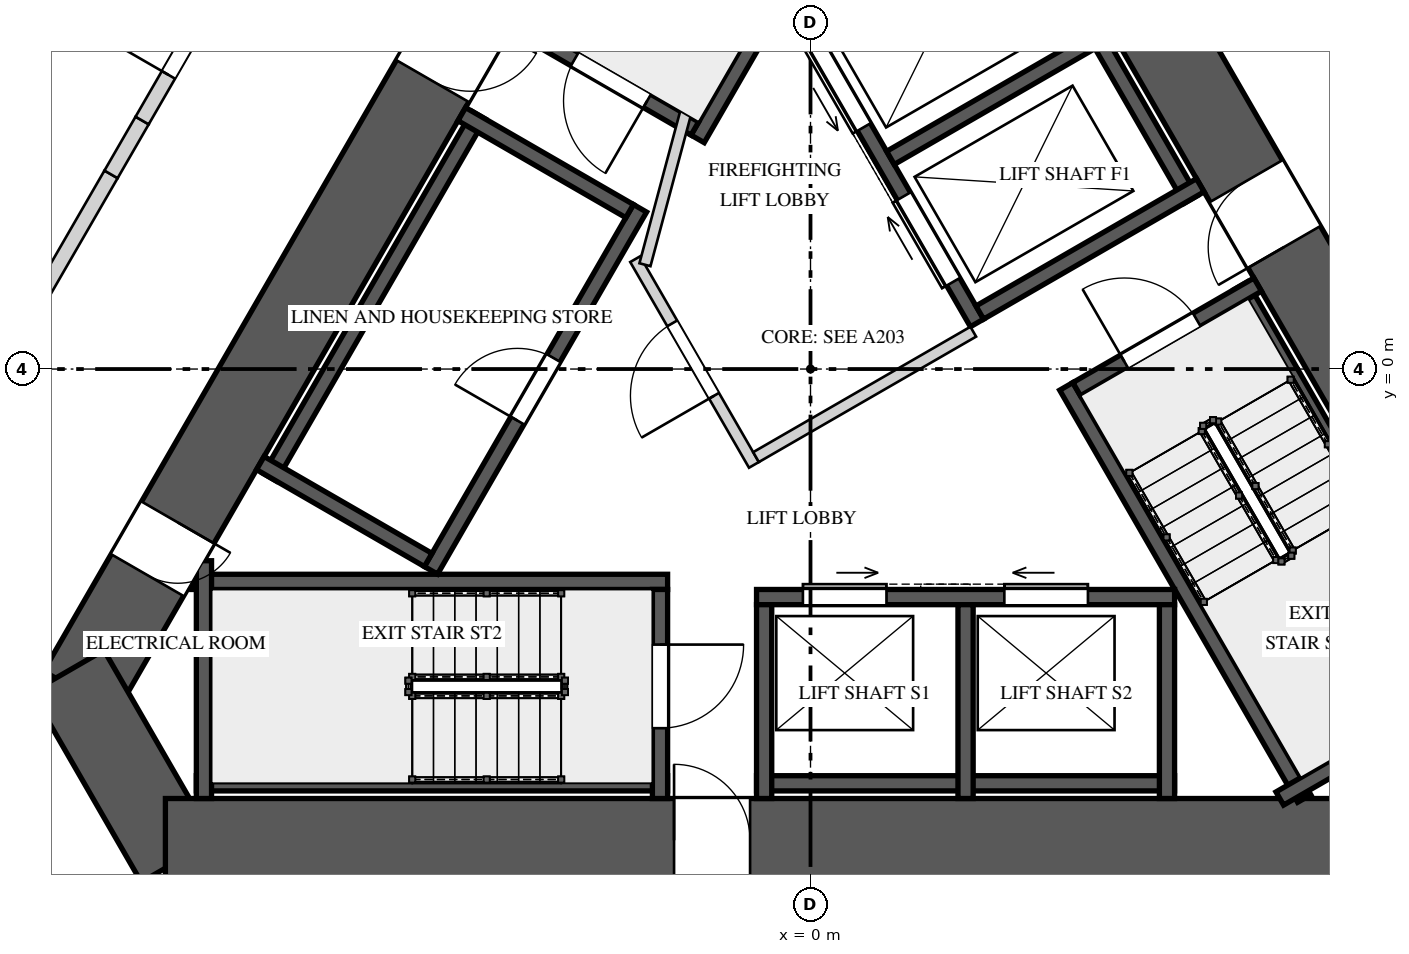
"""IFC4 building model, lengths in metres.
Left out: names, types, materials, properties, quantities, classifications, styles, units other than length and angle.
Written with IfcOpenShell. Run it as: python <this file> out.ifc"""

import sys

from ifc_helpers import new_model, si_unit, direction, frame, frame_2d, origin, place, context, subcontext, project, spatial, rectangle, extrude, element, fill, save


model = new_model("IFC4")
c1 = context("Model", 3, precision=1e-05, world=origin(), true_north=direction((0.0, 1.0)))
c2 = subcontext(c1, "Body", "Model", "MODEL_VIEW")
j1 = project(units=[si_unit("LENGTHUNIT", "METRE"), si_unit("PLANEANGLEUNIT", "RADIAN")], contexts=[c1])
p1 = place(None, origin())
s1 = spatial("IfcSite", under=j1, at=p1, CompositionType="ELEMENT")
p2 = place(p1, origin())
s2 = spatial("IfcBuilding", under=s1, at=p2, CompositionType="ELEMENT")
p3 = place(p2, frame((0.0, 0.0, 10.0)))
s3 = spatial("IfcBuildingStorey", under=s2, at=p3, CompositionType="ELEMENT", Elevation=10.0)
p4 = place(p3, frame((-1.126, 10.45, 0.0), z_axis=(0.0, 0.0, 1.0), x_axis=(-0.500001757713, -0.866024388966, 0.0)))
e1 = element("IfcWall", 1, at=p4, inside=s3, PredefinedType="SHEAR", context=c2, shape_type="SweptSolid", body=[
    extrude(rectangle(XDim=16.974, YDim=1.1, at=frame_2d((8.487, 0.0))), origin(), (0.0, 0.0, 1.0), 5.0),
])
p5 = place(p4, frame((6.692, 0.0, 0.0)))
e2 = element("IfcOpeningElement", 2, at=p5, cuts=e1, PredefinedType="OPENING", context=c2, shape_type="SweptSolid", body=[
    extrude(rectangle(XDim=1.0, YDim=2.4, at=frame_2d((0.5, 1.2))), frame((0.0, 0.56, 0.0), z_axis=(0.0, -1.0, 0.0), x_axis=(1.0, 0.0, 0.0)), (0.0, 0.0, 1.0), 1.12),
])
p6 = place(p4, frame((14.397, 0.0, 0.0)))
e3 = element("IfcOpeningElement", 3, at=p6, cuts=e1, PredefinedType="OPENING", context=c2, shape_type="SweptSolid", body=[
    extrude(rectangle(XDim=0.8, YDim=2.1, at=frame_2d((0.4, 1.05))), frame((0.0, 0.56, 0.0), z_axis=(0.0, -1.0, 0.0), x_axis=(1.0, 0.0, 0.0)), (0.0, 0.0, 1.0), 1.12),
])
p7 = place(p3, frame((-9.772, -3.975, 0.0), z_axis=(0.0, 0.0, 1.0), x_axis=(0.499995765644, -0.866027848477, 0.0)))
e4 = element("IfcWall", 4, at=p7, inside=s3, PredefinedType="SHEAR", context=c2, shape_type="SweptSolid", body=[
    extrude(rectangle(XDim=2.887, YDim=1.1, at=frame_2d((1.443, 0.0))), origin(), (0.0, 0.0, 1.0), 5.0),
])
p8 = place(p3, frame((-8.487, -6.2, 0.0), z_axis=(0.0, 0.0, 1.0), x_axis=(1.0, 0.0, 0.0)))
e5 = element("IfcWall", 5, at=p8, inside=s3, PredefinedType="SHEAR", context=c2, shape_type="SweptSolid", body=[
    extrude(rectangle(XDim=16.974, YDim=1.1, at=frame_2d((8.487, 0.0))), origin(), (0.0, 0.0, 1.0), 5.0),
])
p9 = place(p8, frame((6.692, 0.0, 0.0)))
e6 = element("IfcOpeningElement", 6, at=p9, cuts=e5, PredefinedType="OPENING", context=c2, shape_type="SweptSolid", body=[
    extrude(rectangle(XDim=1.0, YDim=2.4, at=frame_2d((0.5, 1.2))), frame((0.0, 0.56, 0.0), z_axis=(0.0, -1.0, 0.0), x_axis=(1.0, 0.0, 0.0)), (0.0, 0.0, 1.0), 1.12),
])
p10 = place(p3, frame((9.613, -4.25, 0.0), z_axis=(0.0, 0.0, 1.0), x_axis=(-0.500001757713, 0.866024388966, 0.0)))
e7 = element("IfcWall", 7, at=p10, inside=s3, PredefinedType="SHEAR", context=c2, shape_type="SweptSolid", body=[
    extrude(rectangle(XDim=16.974, YDim=1.1, at=frame_2d((8.487, 0.0))), origin(), (0.0, 0.0, 1.0), 5.0),
])
p11 = place(p10, frame((6.762, 0.0, 0.0)))
e8 = element("IfcOpeningElement", 8, at=p11, cuts=e7, PredefinedType="OPENING", context=c2, shape_type="SweptSolid", body=[
    extrude(rectangle(XDim=1.0, YDim=2.4, at=frame_2d((0.5, 1.2))), frame((0.0, 0.56, 0.0), z_axis=(0.0, -1.0, 0.0), x_axis=(1.0, 0.0, 0.0)), (0.0, 0.0, 1.0), 1.12),
])
p12 = place(p3, frame((1.646, 8.45, 0.0), z_axis=(0.0, 0.0, 1.0), x_axis=(-0.500006002103, -0.866021938441, 0.0)))
e9 = element("IfcWall", 9, at=p12, inside=s3, PredefinedType="SOLIDWALL", context=c2, shape_type="SweptSolid", body=[
    extrude(rectangle(XDim=6.261, YDim=0.2, at=frame_2d((3.13, 0.0))), origin(), (0.0, 0.0, 1.0), 4.65),
])
p13 = place(p3, frame((-1.521, 3.165, 0.0), z_axis=(0.0, 0.0, 1.0), x_axis=(-0.866027397988, 0.499996545922, 0.0)))
e10 = element("IfcWall", 10, at=p13, inside=s3, PredefinedType="SOLIDWALL", context=c2, shape_type="SweptSolid", body=[
    extrude(rectangle(XDim=2.75, YDim=0.2, at=frame_2d((1.375, 0.0))), origin(), (0.0, 0.0, 1.0), 4.65),
])
p14 = place(p13, frame((0.725, 0.0, 0.0)))
e11 = element("IfcOpeningElement", 11, at=p14, cuts=e10, PredefinedType="OPENING", context=c2, shape_type="SweptSolid", body=[
    extrude(rectangle(XDim=1.1, YDim=2.4, at=frame_2d((0.55, 1.2))), frame((0.0, 0.11, 0.0), z_axis=(0.0, -1.0, 0.0), x_axis=(1.0, 0.0, 0.0)), (0.0, 0.0, 1.0), 0.22),
])
p15 = place(p3, frame((-8.08, -5.45, 0.0), z_axis=(0.0, 0.0, 1.0), x_axis=(1.0, 0.0, 0.0)))
e12 = element("IfcWall", 12, at=p15, inside=s3, PredefinedType="SOLIDWALL", context=c2, shape_type="SweptSolid", body=[
    extrude(rectangle(XDim=6.2, YDim=0.2, at=frame_2d((3.1, 0.0))), origin(), (0.0, 0.0, 1.0), 4.65),
])
p16 = place(p3, frame((-8.141, -2.8, 0.0), z_axis=(0.0, 0.0, 1.0), x_axis=(1.0, 0.0, 0.0)))
e13 = element("IfcWall", 13, at=p16, inside=s3, PredefinedType="SOLIDWALL", context=c2, shape_type="SweptSolid", body=[
    extrude(rectangle(XDim=6.261, YDim=0.2, at=frame_2d((3.13, 0.0))), origin(), (0.0, 0.0, 1.0), 4.65),
])
p17 = place(p3, frame((-7.98, -2.522, 0.0), z_axis=(0.0, 0.0, 1.0), x_axis=(0.0, -1.0, 0.0)))
e14 = element("IfcWall", 14, at=p17, inside=s3, PredefinedType="SOLIDWALL", context=c2, shape_type="SweptSolid", body=[
    extrude(rectangle(XDim=3.128, YDim=0.2, at=frame_2d((1.564, 0.0))), origin(), (0.0, 0.0, 1.0), 4.65),
])
p18 = place(p3, frame((-1.98, -2.9, 0.0), z_axis=(0.0, 0.0, 1.0), x_axis=(0.0, -1.0, 0.0)))
e15 = element("IfcWall", 15, at=p18, inside=s3, PredefinedType="SOLIDWALL", context=c2, shape_type="SweptSolid", body=[
    extrude(rectangle(XDim=2.75, YDim=0.2, at=frame_2d((1.375, 0.0))), origin(), (0.0, 0.0, 1.0), 4.65),
])
p19 = place(p18, frame((0.725, 0.0, 0.0)))
e16 = element("IfcOpeningElement", 16, at=p19, cuts=e15, PredefinedType="OPENING", context=c2, shape_type="SweptSolid", body=[
    extrude(rectangle(XDim=1.1, YDim=2.4, at=frame_2d((0.55, 1.2))), frame((0.0, 0.11, 0.0), z_axis=(0.0, -1.0, 0.0), x_axis=(1.0, 0.0, 0.0)), (0.0, 0.0, 1.0), 0.22),
])
p20 = place(p3, frame((8.76, -4.272, 0.0), z_axis=(0.0, 0.0, 1.0), x_axis=(-0.49998037582, 0.866036733513, 0.0)))
e17 = element("IfcWall", 17, at=p20, inside=s3, PredefinedType="SOLIDWALL", context=c2, shape_type="SweptSolid", body=[
    extrude(rectangle(XDim=6.2, YDim=0.2, at=frame_2d((3.1, 0.0))), origin(), (0.0, 0.0, 1.0), 4.65),
])
p21 = place(p3, frame((6.495, -5.65, 0.0), z_axis=(0.0, 0.0, 1.0), x_axis=(-0.499976754523, 0.866038824151, 0.0)))
e18 = element("IfcWall", 18, at=p21, inside=s3, PredefinedType="SOLIDWALL", context=c2, shape_type="SweptSolid", body=[
    extrude(rectangle(XDim=6.26, YDim=0.2, at=frame_2d((3.13, 0.0))), origin(), (0.0, 0.0, 1.0), 4.65),
])
p22 = place(p3, frame((6.174, -5.65, 0.0), z_axis=(0.0, 0.0, 1.0), x_axis=(0.866054327916, 0.499949898588, 0.0)))
e19 = element("IfcWall", 19, at=p22, inside=s3, PredefinedType="SOLIDWALL", context=c2, shape_type="SweptSolid", body=[
    extrude(rectangle(XDim=3.128, YDim=0.2, at=frame_2d((1.564, 0.0))), origin(), (0.0, 0.0, 1.0), 4.65),
])
p23 = place(p3, frame((3.501, -0.265, 0.0), z_axis=(0.0, 0.0, 1.0), x_axis=(0.866027397988, 0.499996545922, 0.0)))
e20 = element("IfcWall", 20, at=p23, inside=s3, PredefinedType="SOLIDWALL", context=c2, shape_type="SweptSolid", body=[
    extrude(rectangle(XDim=2.75, YDim=0.2, at=frame_2d((1.375, 0.0))), origin(), (0.0, 0.0, 1.0), 4.65),
])
p24 = place(p23, frame((0.725, 0.0, 0.0)))
e21 = element("IfcOpeningElement", 21, at=p24, cuts=e20, PredefinedType="OPENING", context=c2, shape_type="SweptSolid", body=[
    extrude(rectangle(XDim=1.1, YDim=2.4, at=frame_2d((0.55, 1.2))), frame((0.0, 0.11, 0.0), z_axis=(0.0, -1.0, 0.0), x_axis=(1.0, 0.0, 0.0)), (0.0, 0.0, 1.0), 0.22),
])
p25 = place(p3, frame((-4.993, -2.648, 0.0), z_axis=(0.0, 0.0, 1.0), x_axis=(0.499996545922, 0.866027397988, 0.0)))
e22 = element("IfcWall", 22, at=p25, inside=s3, PredefinedType="SOLIDWALL", context=c2, shape_type="SweptSolid", body=[
    extrude(rectangle(XDim=5.5, YDim=0.2, at=frame_2d((2.75, 0.0))), origin(), (0.0, 0.0, 1.0), 4.65),
])
p26 = place(p25, frame((2.275, 0.0, 0.0)))
e23 = element("IfcOpeningElement", 23, at=p26, cuts=e22, PredefinedType="OPENING", context=c2, shape_type="SweptSolid", body=[
    extrude(rectangle(XDim=0.95, YDim=2.4, at=frame_2d((0.475, 1.2))), frame((0.0, 0.11, 0.0), z_axis=(0.0, -1.0, 0.0), x_axis=(1.0, 0.0, 0.0)), (0.0, 0.0, 1.0), 0.22),
])
p27 = place(p3, frame((-4.365, 3.34, 0.0), z_axis=(0.0, 0.0, 1.0), x_axis=(-0.499996545922, -0.866027397988, 0.0)))
e24 = element("IfcWall", 24, at=p27, inside=s3, PredefinedType="SOLIDWALL", context=c2, shape_type="SweptSolid", body=[
    extrude(rectangle(XDim=5.5, YDim=0.2, at=frame_2d((2.75, 0.0))), origin(), (0.0, 0.0, 1.0), 4.65),
])
for number, where, z_axis, x_axis in (
    (25, (-2.38, 2.078, 0.0), (0.0, 0.0, 1.0), (-0.866, 0.5, 0.0)),
    (26, (-5.03, -2.512, 0.0), (0.0, 0.0, 1.0), (-0.866, 0.5, 0.0)),
):
    element("IfcWall", number, at=place(p3, frame(where, z_axis=z_axis, x_axis=x_axis)), inside=s3, PredefinedType="SOLIDWALL", context=c2, shape_type="SweptSolid", body=[
        extrude(rectangle(XDim=2.55, YDim=0.2, at=frame_2d((1.275, 0.0))), origin(), (0.0, 0.0, 1.0), 4.65),
    ])
p28 = place(p3, frame((-0.71, -3.0, 0.0), z_axis=(0.0, 0.0, 1.0), x_axis=(1.0, 0.0, 0.0)))
e27 = element("IfcWall", 27, at=p28, inside=s3, PredefinedType="SOLIDWALL", context=c2, shape_type="SweptSolid", body=[
    extrude(rectangle(XDim=5.5, YDim=0.2, at=frame_2d((2.75, 0.0))), origin(), (0.0, 0.0, 1.0), 4.65),
])
p29 = place(p28, frame((0.61, 0.0, 0.0)))
e28 = element("IfcOpeningElement", 28, at=p29, cuts=e27, PredefinedType="OPENING", context=c2, shape_type="SweptSolid", body=[
    extrude(rectangle(XDim=1.1, YDim=2.1, at=frame_2d((0.55, 1.05))), frame((0.0, 0.11, 0.0), z_axis=(0.0, -1.0, 0.0), x_axis=(1.0, 0.0, 0.0)), (0.0, 0.0, 1.0), 0.22),
])
p30 = place(p28, frame((3.26, 0.0, 0.0)))
e29 = element("IfcOpeningElement", 29, at=p30, cuts=e27, PredefinedType="OPENING", context=c2, shape_type="SweptSolid", body=[
    extrude(rectangle(XDim=1.1, YDim=2.1, at=frame_2d((0.55, 1.05))), frame((0.0, 0.11, 0.0), z_axis=(0.0, -1.0, 0.0), x_axis=(1.0, 0.0, 0.0)), (0.0, 0.0, 1.0), 0.22),
])
p31 = place(p3, frame((-0.71, -5.45, 0.0), z_axis=(0.0, 0.0, 1.0), x_axis=(1.0, 0.0, 0.0)))
e30 = element("IfcWall", 30, at=p31, inside=s3, PredefinedType="SOLIDWALL", context=c2, shape_type="SweptSolid", body=[
    extrude(rectangle(XDim=5.5, YDim=0.2, at=frame_2d((2.75, 0.0))), origin(), (0.0, 0.0, 1.0), 4.65),
])
for number, where, z_axis, x_axis in (
    (31, (-0.61, -3.1, 0.0), (0.0, 0.0, 1.0), (0.0, -1.0, 0.0)),
    (32, (2.04, -3.1, 0.0), (0.0, 0.0, 1.0), (0.0, -1.0, 0.0)),
    (33, (4.69, -3.1, 0.0), (0.0, 0.0, 1.0), (0.0, -1.0, 0.0)),
):
    element("IfcWall", number, at=place(p3, frame(where, z_axis=z_axis, x_axis=x_axis)), inside=s3, PredefinedType="SOLIDWALL", context=c2, shape_type="SweptSolid", body=[
        extrude(rectangle(XDim=2.55, YDim=0.2, at=frame_2d((1.275, 0.0))), origin(), (0.0, 0.0, 1.0), 4.65),
    ])
p32 = place(p3, frame((2.19, 0.606, 0.0), z_axis=(0.0, 0.0, 1.0), x_axis=(-0.500002801628, 0.866023786258, 0.0)))
e34 = element("IfcWall", 34, at=p32, inside=s3, PredefinedType="SOLIDWALL", context=c2, shape_type="SweptSolid", body=[
    extrude(rectangle(XDim=4.9, YDim=0.2, at=frame_2d((2.45, 0.0))), origin(), (0.0, 0.0, 1.0), 4.65),
])
p33 = place(p32, frame((0.625, 0.0, 0.0)))
e35 = element("IfcOpeningElement", 35, at=p33, cuts=e34, PredefinedType="OPENING", context=c2, shape_type="SweptSolid", body=[
    extrude(rectangle(XDim=1.3, YDim=2.1, at=frame_2d((0.65, 1.05))), frame((0.0, 0.11, 0.0), z_axis=(0.0, -1.0, 0.0), x_axis=(1.0, 0.0, 0.0)), (0.0, 0.0, 1.0), 0.22),
])
p34 = place(p32, frame((2.975, 0.0, 0.0)))
e36 = element("IfcOpeningElement", 36, at=p34, cuts=e34, PredefinedType="OPENING", context=c2, shape_type="SweptSolid", body=[
    extrude(rectangle(XDim=1.3, YDim=2.1, at=frame_2d((0.65, 1.05))), frame((0.0, 0.11, 0.0), z_axis=(0.0, -1.0, 0.0), x_axis=(1.0, 0.0, 0.0)), (0.0, 0.0, 1.0), 0.22),
])
p35 = place(p3, frame((5.005, 2.231, 0.0), z_axis=(0.0, 0.0, 1.0), x_axis=(-0.500002801628, 0.866023786258, 0.0)))
e37 = element("IfcWall", 37, at=p35, inside=s3, PredefinedType="SOLIDWALL", context=c2, shape_type="SweptSolid", body=[
    extrude(rectangle(XDim=4.9, YDim=0.2, at=frame_2d((2.45, 0.0))), origin(), (0.0, 0.0, 1.0), 4.65),
])
p36 = place(p3, frame((2.227, 0.743, 0.0), z_axis=(0.0, 0.0, 1.0), x_axis=(0.866014461049, 0.500018952895, 0.0)))
e38 = element("IfcWall", 38, at=p36, inside=s3, PredefinedType="SOLIDWALL", context=c2, shape_type="SweptSolid", body=[
    extrude(rectangle(XDim=3.35, YDim=0.2, at=frame_2d((1.675, 0.0))), origin(), (0.0, 0.0, 1.0), 4.65),
])
p37 = place(p3, frame((1.052, 2.778, 0.0), z_axis=(0.0, 0.0, 1.0), x_axis=(0.866032680314, 0.499987396469, 0.0)))
e39 = element("IfcWall", 39, at=p37, inside=s3, PredefinedType="SOLIDWALL", context=c2, shape_type="SweptSolid", body=[
    extrude(rectangle(XDim=3.35, YDim=0.2, at=frame_2d((1.675, 0.0))), origin(), (0.0, 0.0, 1.0), 4.65),
])
p38 = place(p3, frame((-0.744, -1.261, 0.0), z_axis=(0.0, 0.0, 1.0), x_axis=(-0.500004234368, 0.866022959057, 0.0)))
e40 = element("IfcWall", 40, at=p38, inside=s3, PredefinedType="PARTITIONING", context=c2, shape_type="SweptSolid", body=[
    extrude(rectangle(XDim=3.125, YDim=0.15, at=frame_2d((1.562, 0.0))), origin(), (0.0, 0.0, 1.0), 4.65),
])
p39 = place(p38, frame((1.05, 0.0, 0.0)))
e41 = element("IfcOpeningElement", 41, at=p39, cuts=e40, PredefinedType="OPENING", context=c2, shape_type="SweptSolid", body=[
    extrude(rectangle(XDim=1.1, YDim=2.4, at=frame_2d((0.55, 1.2))), frame((0.0, 0.085, 0.0), z_axis=(0.0, -1.0, 0.0), x_axis=(1.0, 0.0, 0.0)), (0.0, 0.0, 1.0), 0.17),
])
p40 = place(p3, frame((-0.717, -1.159, 0.0), z_axis=(0.0, 0.0, 1.0), x_axis=(0.866008176907, 0.50002983664, 0.0)))
e42 = element("IfcWall", 42, at=p40, inside=s3, PredefinedType="PARTITIONING", context=c2, shape_type="SweptSolid", body=[
    extrude(rectangle(XDim=3.3, YDim=0.15, at=frame_2d((1.65, 0.0))), origin(), (0.0, 0.0, 1.0), 4.65),
])
p41 = place(p3, frame((-2.178, 1.372, 0.0), z_axis=(0.0, 0.0, 1.0), x_axis=(0.258808958833, 0.96592852884, 0.0)))
e43 = element("IfcWall", 43, at=p41, inside=s3, PredefinedType="PARTITIONING", context=c2, shape_type="SweptSolid", body=[
    extrude(rectangle(XDim=2.903, YDim=0.15, at=frame_2d((1.451, 0.0))), origin(), (0.0, 0.0, 1.0), 4.65),
])
p42 = place(p3, frame((-1.51, 4.215, 0.0), z_axis=(0.0, 0.0, 1.0), x_axis=(0.866085525409, 0.49989585183, 0.0)))
e44 = element("IfcWall", 44, at=p42, inside=s3, PredefinedType="PARTITIONING", context=c2, shape_type="SweptSolid", body=[
    extrude(rectangle(XDim=1.3, YDim=0.15, at=frame_2d((0.65, 0.0))), origin(), (0.0, 0.0, 1.0), 4.65),
])
p43 = place(p3, frame((-10.734, -0.093, 0.0), z_axis=(0.0, 0.0, 1.0), x_axis=(0.499952348839, 0.866052913447, 0.0)))
e45 = element("IfcWall", 45, at=p43, inside=s3, PredefinedType="SOLIDWALL", context=c2, shape_type="SweptSolid", body=[
    extrude(rectangle(XDim=3.064, YDim=0.2, at=frame_2d((1.532, 0.0))), origin(), (0.0, 0.0, 1.0), 4.65),
])
p44 = place(p3, frame((-9.202, 2.561, 0.0), z_axis=(0.0, 0.0, 1.0), x_axis=(0.500118501653, 0.865956976012, 0.0)))
e46 = element("IfcWall", 46, at=p44, inside=s3, PredefinedType="SOLIDWALL", context=c2, shape_type="SweptSolid", body=[
    extrude(rectangle(XDim=0.818, YDim=0.2, at=frame_2d((0.409, 0.0))), origin(), (0.0, 0.0, 1.0), 3.75),
])
p45 = place(p3, frame((-8.793, 3.27, 0.0), z_axis=(0.0, 0.0, 1.0), x_axis=(0.499947505232, 0.866055709532, 0.0)))
e47 = element("IfcWall", 47, at=p45, inside=s3, PredefinedType="SOLIDWALL", context=c2, shape_type="SweptSolid", body=[
    extrude(rectangle(XDim=3.13, YDim=0.2, at=frame_2d((1.565, 0.0))), origin(), (0.0, 0.0, 1.0), 4.65),
])
p46 = place(p45, frame((0.693, 0.0, 0.0)))
e48 = element("IfcOpeningElement", 48, at=p46, cuts=e47, PredefinedType="OPENING", context=c2, shape_type="SweptSolid", body=[
    extrude(rectangle(XDim=1.1, YDim=2.4, at=frame_2d((0.55, 1.2))), frame((0.0, 0.11, 0.0), z_axis=(0.0, -1.0, 0.0), x_axis=(1.0, 0.0, 0.0)), (0.0, 0.0, 1.0), 0.22),
])
p47 = place(p14, origin())
e49 = element("IfcDoor", 49, at=p47, inside=s3, OperationType="SINGLE_SWING_RIGHT", PredefinedType="DOOR", context=c2, shape_type="SweptSolid", body=[
    extrude(rectangle(XDim=1.1, YDim=2.4, at=frame_2d((0.55, 1.2))), frame((0.0, 0.025, 0.0), z_axis=(0.0, -1.0, 0.0), x_axis=(1.0, 0.0, 0.0)), (0.0, 0.0, 1.0), 0.05),
])
fill(e11, e49)
p48 = place(p19, origin())
e50 = element("IfcDoor", 50, at=p48, inside=s3, OperationType="SINGLE_SWING_LEFT", PredefinedType="DOOR", context=c2, shape_type="SweptSolid", body=[
    extrude(rectangle(XDim=1.1, YDim=2.4, at=frame_2d((0.55, 1.2))), frame((0.0, 0.025, 0.0), z_axis=(0.0, -1.0, 0.0), x_axis=(1.0, 0.0, 0.0)), (0.0, 0.0, 1.0), 0.05),
])
fill(e16, e50)
p49 = place(p24, origin())
e51 = element("IfcDoor", 51, at=p49, inside=s3, OperationType="SINGLE_SWING_RIGHT", PredefinedType="DOOR", context=c2, shape_type="SweptSolid", body=[
    extrude(rectangle(XDim=1.1, YDim=2.4, at=frame_2d((0.55, 1.2))), frame((0.0, 0.025, 0.0), z_axis=(0.0, -1.0, 0.0), x_axis=(1.0, 0.0, 0.0)), (0.0, 0.0, 1.0), 0.05),
])
fill(e21, e51)
p50 = place(p26, origin())
e52 = element("IfcDoor", 52, at=p50, inside=s3, OperationType="SINGLE_SWING_LEFT", PredefinedType="DOOR", context=c2, shape_type="SweptSolid", body=[
    extrude(rectangle(XDim=0.95, YDim=2.4, at=frame_2d((0.475, 1.2))), frame((0.0, 0.025, 0.0), z_axis=(0.0, -1.0, 0.0), x_axis=(1.0, 0.0, 0.0)), (0.0, 0.0, 1.0), 0.05),
])
fill(e23, e52)
p51 = place(p29, origin())
e53 = element("IfcDoor", 53, at=p51, inside=s3, OperationType="SLIDING_TO_RIGHT", PredefinedType="DOOR", context=c2, shape_type="SweptSolid", body=[
    extrude(rectangle(XDim=1.1, YDim=2.1, at=frame_2d((0.55, 1.05))), frame((0.0, 0.025, 0.0), z_axis=(0.0, -1.0, 0.0), x_axis=(1.0, 0.0, 0.0)), (0.0, 0.0, 1.0), 0.05),
])
fill(e28, e53)
p52 = place(p30, origin())
e54 = element("IfcDoor", 54, at=p52, inside=s3, OperationType="SLIDING_TO_LEFT", PredefinedType="DOOR", context=c2, shape_type="SweptSolid", body=[
    extrude(rectangle(XDim=1.1, YDim=2.1, at=frame_2d((0.55, 1.05))), frame((0.0, 0.025, 0.0), z_axis=(0.0, -1.0, 0.0), x_axis=(1.0, 0.0, 0.0)), (0.0, 0.0, 1.0), 0.05),
])
fill(e29, e54)
p53 = place(p33, origin())
e55 = element("IfcDoor", 55, at=p53, inside=s3, OperationType="SLIDING_TO_RIGHT", PredefinedType="DOOR", context=c2, shape_type="SweptSolid", body=[
    extrude(rectangle(XDim=1.3, YDim=2.1, at=frame_2d((0.65, 1.05))), frame((0.0, 0.025, 0.0), z_axis=(0.0, -1.0, 0.0), x_axis=(1.0, 0.0, 0.0)), (0.0, 0.0, 1.0), 0.05),
])
fill(e35, e55)
p54 = place(p34, origin())
e56 = element("IfcDoor", 56, at=p54, inside=s3, OperationType="SLIDING_TO_LEFT", PredefinedType="DOOR", context=c2, shape_type="SweptSolid", body=[
    extrude(rectangle(XDim=1.3, YDim=2.1, at=frame_2d((0.65, 1.05))), frame((0.0, 0.025, 0.0), z_axis=(0.0, -1.0, 0.0), x_axis=(1.0, 0.0, 0.0)), (0.0, 0.0, 1.0), 0.05),
])
fill(e36, e56)
p55 = place(p39, origin())
e57 = element("IfcDoor", 57, at=p55, inside=s3, OperationType="SINGLE_SWING_RIGHT", PredefinedType="DOOR", context=c2, shape_type="SweptSolid", body=[
    extrude(rectangle(XDim=1.1, YDim=2.4, at=frame_2d((0.55, 1.2))), frame((0.0, 0.025, 0.0), z_axis=(0.0, -1.0, 0.0), x_axis=(1.0, 0.0, 0.0)), (0.0, 0.0, 1.0), 0.05),
])
fill(e41, e57)
p56 = place(p5, origin())
e58 = element("IfcDoor", 58, at=p56, inside=s3, OperationType="SINGLE_SWING_LEFT", PredefinedType="DOOR", context=c2, shape_type="SweptSolid", body=[
    extrude(rectangle(XDim=1.0, YDim=2.4, at=frame_2d((0.5, 1.2))), frame((0.0, 0.025, 0.0), z_axis=(0.0, -1.0, 0.0), x_axis=(1.0, 0.0, 0.0)), (0.0, 0.0, 1.0), 0.05),
])
fill(e2, e58)
p57 = place(p9, origin())
e59 = element("IfcDoor", 59, at=p57, inside=s3, OperationType="SINGLE_SWING_RIGHT", PredefinedType="DOOR", context=c2, shape_type="SweptSolid", body=[
    extrude(rectangle(XDim=1.0, YDim=2.4, at=frame_2d((0.5, 1.2))), frame((0.0, 0.025, 0.0), z_axis=(0.0, -1.0, 0.0), x_axis=(1.0, 0.0, 0.0)), (0.0, 0.0, 1.0), 0.05),
])
fill(e6, e59)
p58 = place(p11, origin())
e60 = element("IfcDoor", 60, at=p58, inside=s3, OperationType="SINGLE_SWING_LEFT", PredefinedType="DOOR", context=c2, shape_type="SweptSolid", body=[
    extrude(rectangle(XDim=1.0, YDim=2.4, at=frame_2d((0.5, 1.2))), frame((0.0, 0.025, 0.0), z_axis=(0.0, -1.0, 0.0), x_axis=(1.0, 0.0, 0.0)), (0.0, 0.0, 1.0), 0.05),
])
fill(e8, e60)
p59 = place(p6, origin())
e61 = element("IfcDoor", 61, at=p59, inside=s3, OperationType="SINGLE_SWING_RIGHT", PredefinedType="DOOR", context=c2, shape_type="SweptSolid", body=[
    extrude(rectangle(XDim=0.8, YDim=2.1, at=frame_2d((0.4, 1.05))), frame((0.0, 0.025, 0.0), z_axis=(0.0, -1.0, 0.0), x_axis=(1.0, 0.0, 0.0)), (0.0, 0.0, 1.0), 0.05),
])
fill(e3, e61)
p60 = place(p46, origin())
e62 = element("IfcDoor", 62, at=p60, inside=s3, OperationType="SINGLE_SWING_LEFT", PredefinedType="DOOR", context=c2, shape_type="SweptSolid", body=[
    extrude(rectangle(XDim=1.1, YDim=2.4, at=frame_2d((0.55, 1.2))), frame((0.0, 0.025, 0.0), z_axis=(0.0, -1.0, 0.0), x_axis=(1.0, 0.0, 0.0)), (0.0, 0.0, 1.0), 0.05),
])
fill(e48, e62)
save(model, sys.argv[1])
